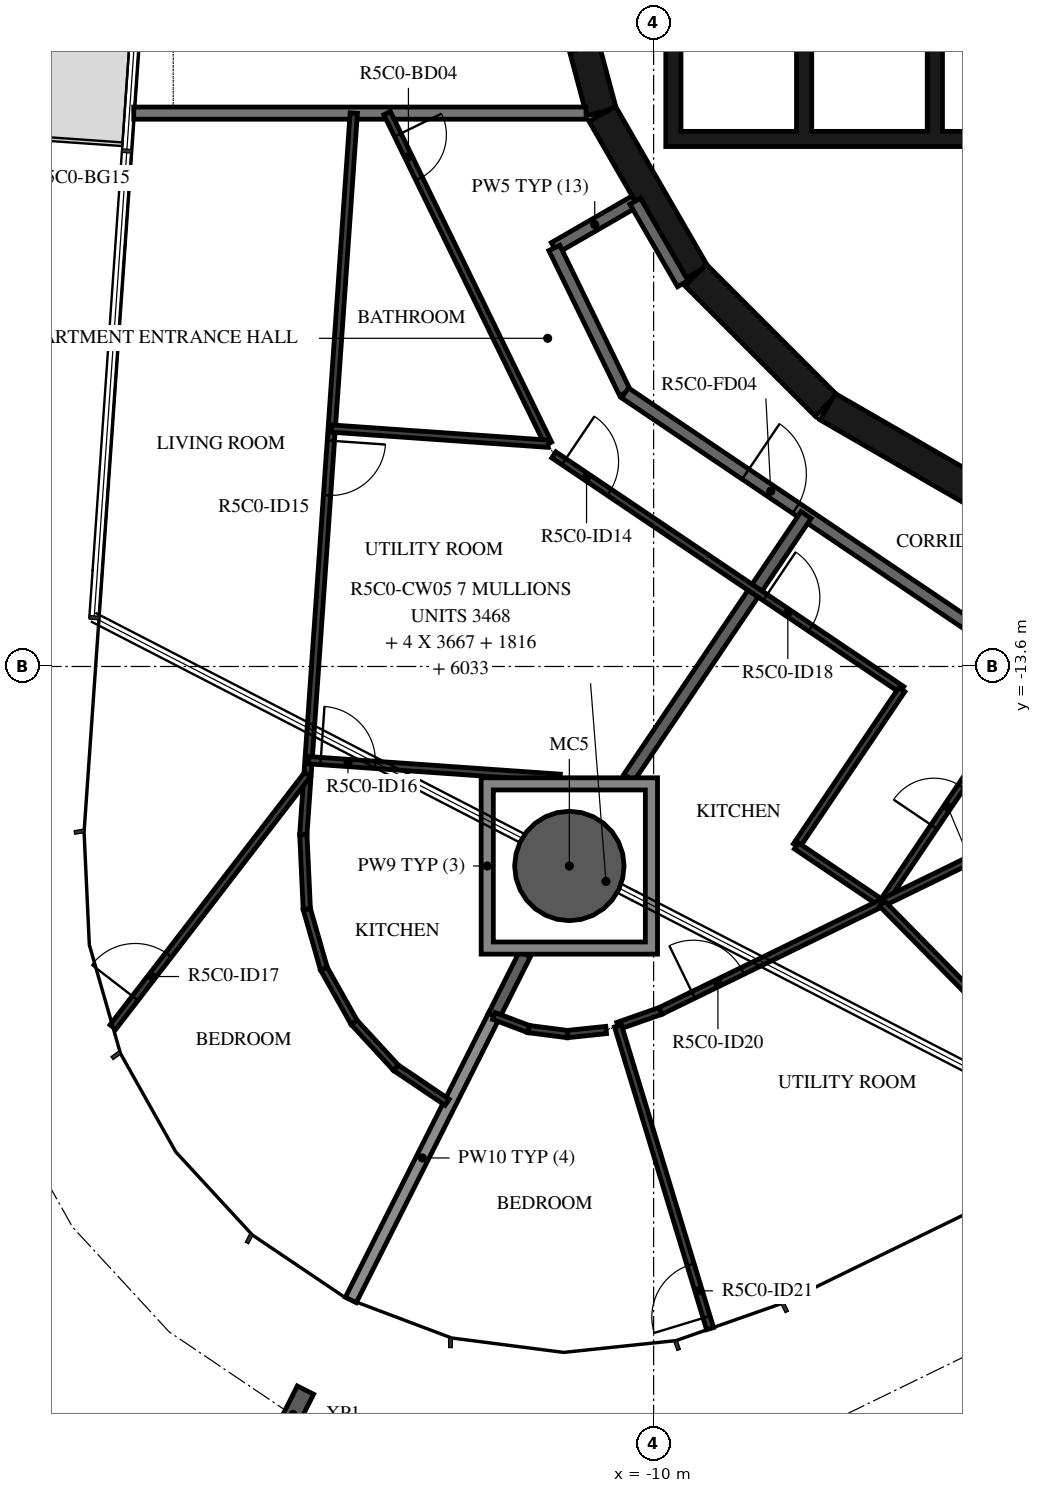
"""IFC4 building model, lengths in metres.
Left out: names, types, materials, properties, quantities, classifications, styles, units other than length and angle.
Written with IfcOpenShell. Run it as: python <this file> out.ifc"""

import sys

from ifc_helpers import new_model, si_unit, direction, frame, frame_2d, origin, origin_2d, place, context, subcontext, project, spatial, polyline, rectangle, hollow_circle, i_section, outline, extrude, element, fill, save


model = new_model("IFC4")
c1 = context("Model", 3, precision=1e-05, world=origin(), true_north=direction((0.0, 1.0)))
c2 = subcontext(c1, "Body", "Model", "MODEL_VIEW")
j1 = project(units=[si_unit("LENGTHUNIT", "METRE"), si_unit("PLANEANGLEUNIT", "RADIAN")], contexts=[c1])
p1 = place(None, origin())
s1 = spatial("IfcSite", under=j1, at=p1, CompositionType="ELEMENT")
p2 = place(p1, origin())
s2 = spatial("IfcBuilding", under=s1, at=p2, CompositionType="ELEMENT")
p3 = place(p2, frame((0.0, 0.0, 209.4)))
s3 = spatial("IfcBuildingStorey", under=s2, at=p3, CompositionType="ELEMENT", Elevation=209.4)
p4 = place(p3, frame((-11.386, -16.881, -0.38), z_axis=(0.0, 0.0, 1.0), x_axis=(1.0, 0.0, 0.0)))
e1 = element("IfcColumn", 1, at=p4, inside=s3, PredefinedType="COLUMN", context=c2, shape_type="SweptSolid", body=[
    extrude(hollow_circle(Radius=0.9, WallThickness=0.04, at=origin_2d()), origin(), (0.0, 0.0, 1.0), 3.5),
])
p5 = place(p3, frame((-15.928, -25.902, -0.38), z_axis=(0.0, 0.0, 1.0), x_axis=(-0.893169071277, 0.449721035881, 0.0)))
e2 = element("IfcColumn", 2, at=p5, inside=s3, PredefinedType="COLUMN", context=c2, shape_type="SweptSolid", body=[
    extrude(i_section(OverallWidth=0.3, OverallDepth=0.9, WebThickness=0.019, FlangeThickness=0.035, FilletRadius=0.03, at=origin_2d()), origin(), (0.0, 0.0, 1.0), 3.5),
])
p6 = place(p3, frame((-11.643, -1.55, 0.0), z_axis=(0.0, 0.0, 1.0), x_axis=(0.258734743916, -0.965948410781, 0.0)))
e3 = element("IfcWall", 3, at=p6, inside=s3, PredefinedType="SHEAR", context=c2, shape_type="SweptSolid", body=[
    extrude(rectangle(XDim=3.033, YDim=0.5, at=frame_2d((1.516, 0.0))), origin(), (0.0, 0.0, 1.0), 3.12),
])
p7 = place(p6, frame((1.066, 0.0, 0.0)))
e4 = element("IfcOpeningElement", 4, at=p7, cuts=e3, PredefinedType="OPENING", context=c2, shape_type="SweptSolid", body=[
    extrude(rectangle(XDim=0.9, YDim=2.1, at=frame_2d((0.45, 1.05))), frame((0.0, 0.26, 0.0), z_axis=(0.0, -1.0, 0.0), x_axis=(1.0, 0.0, 0.0)), (0.0, 0.0, 1.0), 0.52),
])
p8 = place(p3, frame((-10.845, -4.51, 0.0), z_axis=(0.0, 0.0, 1.0), x_axis=(0.500087131594, -0.865975092491, 0.0)))
e5 = element("IfcWall", 5, at=p8, inside=s3, PredefinedType="SHEAR", context=c2, shape_type="SweptSolid", body=[
    extrude(rectangle(XDim=3.033, YDim=0.5, at=frame_2d((1.516, 0.0))), origin(), (0.0, 0.0, 1.0), 3.12),
])
p9 = place(p3, frame((-9.308, -7.164, 0.0), z_axis=(0.0, 0.0, 1.0), x_axis=(0.707106781187, -0.707106781187, 0.0)))
e6 = element("IfcWall", 6, at=p9, inside=s3, PredefinedType="SHEAR", context=c2, shape_type="SweptSolid", body=[
    extrude(rectangle(XDim=3.032, YDim=0.5, at=frame_2d((1.516, 0.0))), origin(), (0.0, 0.0, 1.0), 3.12),
])
p10 = place(p3, frame((-7.137, -9.329, 0.0), z_axis=(0.0, 0.0, 1.0), x_axis=(0.865975092491, -0.500087131594, 0.0)))
e7 = element("IfcWall", 7, at=p10, inside=s3, PredefinedType="SHEAR", context=c2, shape_type="SweptSolid", body=[
    extrude(rectangle(XDim=3.033, YDim=0.5, at=frame_2d((1.516, 0.0))), origin(), (0.0, 0.0, 1.0), 3.12),
])
p11 = place(p3, origin())
e8 = element("IfcWall", 8, at=p11, inside=s3, PredefinedType="SHEAR", context=c2, shape_type="SweptSolid", body=[
    extrude(outline(polyline([(9.8, -5.05), (9.8, -4.8), (9.8, -1.9), (9.55, -1.9), (9.55, -4.8), (7.65, -4.8), (7.65, -1.9), (7.4, -1.9), (7.4, -4.8), (5.5, -4.8), (5.5, -1.9), (5.25, -1.9), (5.25, -4.8), (3.35, -4.8), (3.35, -1.9), (3.1, -1.9), (3.1, -4.8), (1.2, -4.8), (1.2, -1.9), (0.95, -1.9), (0.95, -4.8), (-5.25, -4.8), (-5.25, -1.9), (-5.5, -1.9), (-5.5, -4.8), (-7.4, -4.8), (-7.4, -1.9), (-7.65, -1.9), (-7.65, -4.8), (-9.55, -4.8), (-9.55, -1.9), (-9.8, -1.9), (-9.8, -4.8), (-9.8, -5.05), (9.8, -5.05)])), origin(), (0.0, 0.0, 1.0), 3.12),
])
p12 = place(p3, frame((-10.303, -5.949, 0.0), z_axis=(0.0, 0.0, 1.0), x_axis=(-0.866042588199, -0.499970234539, 0.0)))
e9 = element("IfcWall", 9, at=p12, inside=s3, PredefinedType="STANDARD", context=c2, shape_type="SweptSolid", body=[
    extrude(rectangle(XDim=1.535, YDim=0.2, at=frame_2d((0.768, 0.0))), origin(), (0.0, 0.0, 1.0), 3.12),
])
p13 = place(p3, frame((-11.633, -6.716, 0.0), z_axis=(0.0, 0.0, 1.0), x_axis=(0.438322116278, -0.898817958422, 0.0)))
e10 = element("IfcWall", 10, at=p13, inside=s3, PredefinedType="STANDARD", context=c2, shape_type="SweptSolid", body=[
    extrude(rectangle(XDim=2.654, YDim=0.2, at=frame_2d((1.327, 0.0))), origin(), (0.0, 0.0, 1.0), 3.12),
])
p14 = place(p3, frame((-10.47, -9.101, 0.0), z_axis=(0.0, 0.0, 1.0), x_axis=(0.829035841718, -0.559195469534, 0.0)))
e11 = element("IfcWall", 11, at=p14, inside=s3, PredefinedType="STANDARD", context=c2, shape_type="SweptSolid", body=[
    extrude(rectangle(XDim=7.181, YDim=0.2, at=frame_2d((3.591, 0.0))), origin(), (0.0, 0.0, 1.0), 3.12),
])
p15 = place(p14, frame((2.39, 0.0, 0.0)))
e12 = element("IfcOpeningElement", 12, at=p15, cuts=e11, PredefinedType="OPENING", context=c2, shape_type="SweptSolid", body=[
    extrude(rectangle(XDim=1.0, YDim=2.1, at=frame_2d((0.5, 1.05))), frame((0.0, 0.11, 0.0), z_axis=(0.0, -1.0, 0.0), x_axis=(1.0, 0.0, 0.0)), (0.0, 0.0, 1.0), 0.22),
])
p16 = place(p3, frame((-9.52, -7.305, 0.0), z_axis=(0.0, 0.0, 1.0), x_axis=(-0.500028278809, 0.866009076391, 0.0)))
e13 = element("IfcWall", 13, at=p16, inside=s3, PredefinedType="STANDARD", context=c2, shape_type="SweptSolid", body=[
    extrude(rectangle(XDim=1.566, YDim=0.2, at=frame_2d((0.783, 0.0))), origin(), (0.0, 0.0, 1.0), 3.12),
])
p17 = place(p3, frame((-18.55, -4.5, 0.0), z_axis=(0.0, 0.0, 1.0), x_axis=(1.0, 0.0, 0.0)))
e14 = element("IfcWall", 14, at=p17, inside=s3, PredefinedType="STANDARD", context=c2, shape_type="SweptSolid", body=[
    extrude(rectangle(XDim=7.438, YDim=0.2, at=frame_2d((3.719, 0.0))), origin(), (0.0, 0.0, 1.0), 3.12),
])
p18 = place(p3, frame((-10.408, -15.43, 0.0), z_axis=(0.0, 0.0, 1.0), x_axis=(0.559199317758, 0.829033246027, 0.0)))
e15 = element("IfcWall", 15, at=p18, inside=s3, PredefinedType="STANDARD", context=c2, shape_type="SweptSolid", body=[
    extrude(rectangle(XDim=5.212, YDim=0.2, at=frame_2d((2.606, 0.0))), origin(), (0.0, 0.0, 1.0), 3.12),
])
p19 = place(p3, frame((-14.979, -24.017, 0.0), z_axis=(0.0, 0.0, 1.0), x_axis=(0.449732900329, 0.89316309729, 0.0)))
e16 = element("IfcWall", 16, at=p19, inside=s3, PredefinedType="STANDARD", context=c2, shape_type="SweptSolid", body=[
    extrude(rectangle(XDim=5.229, YDim=0.2, at=frame_2d((2.615, 0.0))), origin(), (0.0, 0.0, 1.0), 2.73),
])
p20 = place(p3, frame((-12.628, -19.347, 0.0), z_axis=(0.0, 0.0, 1.0), x_axis=(0.449615653781, 0.8932221246, 0.0)))
e17 = element("IfcWall", 17, at=p20, inside=s3, PredefinedType="STANDARD", context=c2, shape_type="SweptSolid", body=[
    extrude(rectangle(XDim=1.138, YDim=0.2, at=frame_2d((0.569, 0.0))), origin(), (0.0, 0.0, 1.0), 3.12),
])
p21 = place(p3, frame((-14.383, -4.5, 0.0), z_axis=(0.0, 0.0, 1.0), x_axis=(0.438393414895, -0.898783185077, 0.0)))
e18 = element("IfcWall", 18, at=p21, inside=s3, PredefinedType="PARTITIONING", context=c2, shape_type="SweptSolid", body=[
    extrude(rectangle(XDim=6.049, YDim=0.12, at=frame_2d((3.024, 0.0))), origin(), (0.0, 0.0, 1.0), 3.12),
])
p22 = place(p21, frame((0.4, 0.0, 0.0)))
e19 = element("IfcOpeningElement", 19, at=p22, cuts=e18, PredefinedType="OPENING", context=c2, shape_type="SweptSolid", body=[
    extrude(rectangle(XDim=0.8, YDim=2.1, at=frame_2d((0.4, 1.05))), frame((0.0, 0.07, 0.0), z_axis=(0.0, -1.0, 0.0), x_axis=(1.0, 0.0, 0.0)), (0.0, 0.0, 1.0), 0.14),
])
p23 = place(p3, frame((-11.642, -10.12, 0.0), z_axis=(0.0, 0.0, 1.0), x_axis=(0.829029427133, -0.559204979365, 0.0)))
e20 = element("IfcWall", 20, at=p23, inside=s3, PredefinedType="PARTITIONING", context=c2, shape_type="SweptSolid", body=[
    extrude(rectangle(XDim=6.904, YDim=0.12, at=frame_2d((3.452, 0.0))), origin(), (0.0, 0.0, 1.0), 3.12),
])
p24 = place(p23, frame((0.2, 0.0, 0.0)))
e21 = element("IfcOpeningElement", 21, at=p24, cuts=e20, PredefinedType="OPENING", context=c2, shape_type="SweptSolid", body=[
    extrude(rectangle(XDim=0.9, YDim=2.1, at=frame_2d((0.45, 1.05))), frame((0.0, 0.07, 0.0), z_axis=(0.0, -1.0, 0.0), x_axis=(1.0, 0.0, 0.0)), (0.0, 0.0, 1.0), 0.14),
])
p25 = place(p23, frame((4.192, 0.0, 0.0)))
e22 = element("IfcOpeningElement", 22, at=p25, cuts=e20, PredefinedType="OPENING", context=c2, shape_type="SweptSolid", body=[
    extrude(rectangle(XDim=0.9, YDim=2.1, at=frame_2d((0.45, 1.05))), frame((0.0, 0.07, 0.0), z_axis=(0.0, -1.0, 0.0), x_axis=(1.0, 0.0, 0.0)), (0.0, 0.0, 1.0), 0.14),
])
p26 = place(p3, frame((-14.931, -4.5, 0.0), z_axis=(0.0, 0.0, 1.0), x_axis=(-0.069751708439, -0.997564383471, 0.0)))
e23 = element("IfcWall", 23, at=p26, inside=s3, PredefinedType="PARTITIONING", context=c2, shape_type="SweptSolid", body=[
    extrude(rectangle(XDim=11.894, YDim=0.12, at=frame_2d((5.947, 0.0))), origin(), (0.0, 0.0, 1.0), 3.12),
])
p27 = place(p26, frame((5.4, 0.0, 0.0)))
e24 = element("IfcOpeningElement", 24, at=p27, cuts=e23, PredefinedType="OPENING", context=c2, shape_type="SweptSolid", body=[
    extrude(rectangle(XDim=0.9, YDim=2.1, at=frame_2d((0.45, 1.05))), frame((0.0, 0.07, 0.0), z_axis=(0.0, -1.0, 0.0), x_axis=(1.0, 0.0, 0.0)), (0.0, 0.0, 1.0), 0.14),
])
p28 = place(p3, frame((-15.294, -9.688, 0.0), z_axis=(0.0, 0.0, 1.0), x_axis=(0.997565819809, -0.069731163391, 0.0)))
e25 = element("IfcWall", 25, at=p28, inside=s3, PredefinedType="PARTITIONING", context=c2, shape_type="SweptSolid", body=[
    extrude(rectangle(XDim=3.571, YDim=0.12, at=frame_2d((1.786, 0.0))), origin(), (0.0, 0.0, 1.0), 3.12),
])
p29 = place(p3, frame((-18.892, -19.531, 0.0), z_axis=(0.0, 0.0, 1.0), x_axis=(0.610347240441, 0.792133982408, 0.0)))
e26 = element("IfcWall", 26, at=p29, inside=s3, PredefinedType="PARTITIONING", context=c2, shape_type="SweptSolid", body=[
    extrude(rectangle(XDim=5.244, YDim=0.12, at=frame_2d((2.622, 0.0))), origin(), (0.0, 0.0, 1.0), 3.12),
])
p30 = place(p29, frame((0.6, 0.0, 0.0)))
e27 = element("IfcOpeningElement", 27, at=p30, cuts=e26, PredefinedType="OPENING", context=c2, shape_type="SweptSolid", body=[
    extrude(rectangle(XDim=0.9, YDim=2.1, at=frame_2d((0.45, 1.05))), frame((0.0, 0.07, 0.0), z_axis=(0.0, -1.0, 0.0), x_axis=(1.0, 0.0, 0.0)), (0.0, 0.0, 1.0), 0.14),
])
p31 = place(p3, frame((-15.675, -15.141, 0.0), z_axis=(0.0, 0.0, 1.0), x_axis=(0.997563107735, -0.06976995117, 0.0)))
e28 = element("IfcWall", 28, at=p31, inside=s3, PredefinedType="PARTITIONING", context=c2, shape_type="SweptSolid", body=[
    extrude(rectangle(XDim=4.146, YDim=0.12, at=frame_2d((2.073, 0.0))), origin(), (0.0, 0.0, 1.0), 3.12),
])
p32 = place(p31, frame((0.2, 0.0, 0.0)))
e29 = element("IfcOpeningElement", 29, at=p32, cuts=e28, PredefinedType="OPENING", context=c2, shape_type="SweptSolid", body=[
    extrude(rectangle(XDim=0.9, YDim=2.1, at=frame_2d((0.45, 1.05))), frame((0.0, 0.07, 0.0), z_axis=(0.0, -1.0, 0.0), x_axis=(1.0, 0.0, 0.0)), (0.0, 0.0, 1.0), 0.14),
])
for number, where, z_axis, x_axis in (
    (30, (-13.395, -20.767, 0.0), (0.0, 0.0, 1.0), (-0.829, 0.559, 0.0)),
    (31, (-14.237, -20.199, 0.0), (0.0, 0.0, 1.0), (-0.678, 0.735, 0.0)),
):
    element("IfcWall", number, at=place(p3, frame(where, z_axis=z_axis, x_axis=x_axis)), inside=s3, PredefinedType="PARTITIONING", context=c2, shape_type="SweptSolid", body=[
        extrude(rectangle(XDim=1.016, YDim=0.12, at=frame_2d((0.508, 0.0))), origin(), (0.0, 0.0, 1.0), 3.12),
    ])
p33 = place(p3, frame((-14.926, -19.452, 0.0), z_axis=(0.0, 0.0, 1.0), x_axis=(-0.489941776958, 0.871755157823, 0.0)))
e32 = element("IfcWall", 32, at=p33, inside=s3, PredefinedType="PARTITIONING", context=c2, shape_type="SweptSolid", body=[
    extrude(rectangle(XDim=1.016, YDim=0.12, at=frame_2d((0.508, 0.0))), origin(), (0.0, 0.0, 1.0), 3.12),
])
p34 = place(p3, frame((-15.424, -18.567, 0.0), z_axis=(0.0, 0.0, 1.0), x_axis=(-0.275641454312, 0.961260520704, 0.0)))
e33 = element("IfcWall", 33, at=p34, inside=s3, PredefinedType="PARTITIONING", context=c2, shape_type="SweptSolid", body=[
    extrude(rectangle(XDim=1.016, YDim=0.12, at=frame_2d((0.508, 0.0))), origin(), (0.0, 0.0, 1.0), 3.12),
])
p35 = place(p3, frame((-15.704, -17.59, 0.0), z_axis=(0.0, 0.0, 1.0), x_axis=(-0.046364428258, 0.998924591645, 0.0)))
e34 = element("IfcWall", 34, at=p35, inside=s3, PredefinedType="PARTITIONING", context=c2, shape_type="SweptSolid", body=[
    extrude(rectangle(XDim=1.227, YDim=0.12, at=frame_2d((0.613, 0.0))), origin(), (0.0, 0.0, 1.0), 3.12),
])
p36 = place(p3, frame((-5.918, -13.981, 0.0), z_axis=(0.0, 0.0, 1.0), x_axis=(-0.559254999968, -0.828995684555, 0.0)))
e35 = element("IfcWall", 35, at=p36, inside=s3, PredefinedType="PARTITIONING", context=c2, shape_type="SweptSolid", body=[
    extrude(rectangle(XDim=3.099, YDim=0.12, at=frame_2d((1.55, 0.0))), origin(), (0.0, 0.0, 1.0), 3.12),
])
p37 = place(p3, frame((-7.652, -16.55, 0.0), z_axis=(0.0, 0.0, 1.0), x_axis=(0.829053397483, -0.559169441334, 0.0)))
e36 = element("IfcWall", 36, at=p37, inside=s3, PredefinedType="PARTITIONING", context=c2, shape_type="SweptSolid", body=[
    extrude(rectangle(XDim=1.686, YDim=0.12, at=frame_2d((0.843, 0.0))), origin(), (0.0, 0.0, 1.0), 3.12),
])
p38 = place(p3, frame((-6.229, -17.48, 0.0), z_axis=(0.0, 0.0, 1.0), x_axis=(0.559206483048, 0.829028412853, 0.0)))
e37 = element("IfcWall", 37, at=p38, inside=s3, PredefinedType="PARTITIONING", context=c2, shape_type="SweptSolid", body=[
    extrude(rectangle(XDim=3.432, YDim=0.12, at=frame_2d((1.716, 0.0))), origin(), (0.0, 0.0, 1.0), 3.12),
])
p39 = place(p38, frame((1.5, 0.0, 0.0)))
e38 = element("IfcOpeningElement", 38, at=p39, cuts=e37, PredefinedType="OPENING", context=c2, shape_type="SweptSolid", body=[
    extrude(rectangle(XDim=0.8, YDim=2.1, at=frame_2d((0.4, 1.05))), frame((0.0, 0.07, 0.0), z_axis=(0.0, -1.0, 0.0), x_axis=(1.0, 0.0, 0.0)), (0.0, 0.0, 1.0), 0.14),
])
p40 = place(p3, frame((-12.628, -19.347, 0.0), z_axis=(0.0, 0.0, 1.0), x_axis=(0.935507243946, -0.353307509862, 0.0)))
e39 = element("IfcWall", 39, at=p40, inside=s3, PredefinedType="PARTITIONING", context=c2, shape_type="SweptSolid", body=[
    extrude(rectangle(XDim=0.612, YDim=0.12, at=frame_2d((0.306, 0.0))), origin(), (0.0, 0.0, 1.0), 3.12),
])
p41 = place(p3, frame((-12.055, -19.563, 0.0), z_axis=(0.0, 0.0, 1.0), x_axis=(0.991802759529, -0.127778269633, 0.0)))
e40 = element("IfcWall", 40, at=p41, inside=s3, PredefinedType="PARTITIONING", context=c2, shape_type="SweptSolid", body=[
    extrude(rectangle(XDim=0.642, YDim=0.12, at=frame_2d((0.321, 0.0))), origin(), (0.0, 0.0, 1.0), 3.12),
])
p42 = place(p3, frame((-11.418, -19.645, 0.0), z_axis=(0.0, 0.0, 1.0), x_axis=(0.994515867502, 0.104585798686, 0.0)))
e41 = element("IfcWall", 41, at=p42, inside=s3, PredefinedType="PARTITIONING", context=c2, shape_type="SweptSolid", body=[
    extrude(rectangle(XDim=0.642, YDim=0.12, at=frame_2d((0.321, 0.0))), origin(), (0.0, 0.0, 1.0), 3.12),
])
p43 = place(p3, frame((-10.586, -19.51, 0.0), z_axis=(0.0, 0.0, 1.0), x_axis=(0.943560277016, 0.3312008509, 0.0)))
e42 = element("IfcWall", 42, at=p43, inside=s3, PredefinedType="PARTITIONING", context=c2, shape_type="SweptSolid", body=[
    extrude(rectangle(XDim=0.741, YDim=0.12, at=frame_2d((0.371, 0.0))), origin(), (0.0, 0.0, 1.0), 3.12),
])
p44 = place(p3, frame((-9.886, -19.264, 0.0), z_axis=(0.0, 0.0, 1.0), x_axis=(0.898796326112, 0.43836647245, 0.0)))
e43 = element("IfcWall", 43, at=p44, inside=s3, PredefinedType="PARTITIONING", context=c2, shape_type="SweptSolid", body=[
    extrude(rectangle(XDim=10.014, YDim=0.12, at=frame_2d((5.007, 0.0))), origin(), (0.0, 0.0, 1.0), 3.12),
])
p45 = place(p44, frame((0.6, 0.0, 0.0)))
e44 = element("IfcOpeningElement", 44, at=p45, cuts=e43, PredefinedType="OPENING", context=c2, shape_type="SweptSolid", body=[
    extrude(rectangle(XDim=0.9, YDim=2.1, at=frame_2d((0.45, 1.05))), frame((0.0, 0.07, 0.0), z_axis=(0.0, -1.0, 0.0), x_axis=(1.0, 0.0, 0.0)), (0.0, 0.0, 1.0), 0.14),
])
p46 = place(p3, frame((-9.072, -24.489, 0.0), z_axis=(0.0, 0.0, 1.0), x_axis=(-0.291025348593, 0.956715342449, 0.0)))
e45 = element("IfcWall", 45, at=p46, inside=s3, PredefinedType="PARTITIONING", context=c2, shape_type="SweptSolid", body=[
    extrude(rectangle(XDim=5.205, YDim=0.12, at=frame_2d((2.602, 0.0))), origin(), (0.0, 0.0, 1.0), 3.12),
])
p47 = place(p46, frame((0.2, 0.0, 0.0)))
e46 = element("IfcOpeningElement", 46, at=p47, cuts=e45, PredefinedType="OPENING", context=c2, shape_type="SweptSolid", body=[
    extrude(rectangle(XDim=0.9, YDim=2.1, at=frame_2d((0.45, 1.05))), frame((0.0, 0.07, 0.0), z_axis=(0.0, -1.0, 0.0), x_axis=(1.0, 0.0, 0.0)), (0.0, 0.0, 1.0), 0.14),
])
p48 = place(p3, frame((-2.403, -21.4, 0.0), z_axis=(0.0, 0.0, 1.0), x_axis=(-0.70162063199, 0.712550692067, 0.0)))
e47 = element("IfcWall", 47, at=p48, inside=s3, PredefinedType="PARTITIONING", context=c2, shape_type="SweptSolid", body=[
    extrude(rectangle(XDim=5.472, YDim=0.12, at=frame_2d((2.736, 0.0))), origin(), (0.0, 0.0, 1.0), 3.12),
])
p49 = place(p3, origin())
e48 = element("IfcWall", 48, at=p49, inside=s3, PredefinedType="STANDARD", context=c2, shape_type="SweptSolid", body=[
    extrude(outline(polyline([(-9.936, -15.43), (-9.936, -18.331), (-12.836, -18.331), (-12.836, -15.43), (-9.936, -15.43)]), holes=[polyline([(-12.636, -18.131), (-10.136, -18.131), (-10.136, -15.631), (-12.636, -15.631), (-12.636, -18.131)])]), origin(), (0.0, 0.0, 1.0), 3.12),
])
p50 = place(p15, origin())
e49 = element("IfcDoor", 49, at=p50, inside=s3, OperationType="SINGLE_SWING_RIGHT", PredefinedType="DOOR", context=c2, shape_type="SweptSolid", body=[
    extrude(rectangle(XDim=1.0, YDim=2.1, at=frame_2d((0.5, 1.05))), frame((0.0, 0.025, 0.0), z_axis=(0.0, -1.0, 0.0), x_axis=(1.0, 0.0, 0.0)), (0.0, 0.0, 1.0), 0.05),
])
fill(e12, e49)
p51 = place(p22, origin())
e50 = element("IfcDoor", 50, at=p51, inside=s3, OperationType="SINGLE_SWING_RIGHT", PredefinedType="DOOR", context=c2, shape_type="SweptSolid", body=[
    extrude(rectangle(XDim=0.8, YDim=2.1, at=frame_2d((0.4, 1.05))), frame((0.0, 0.025, 0.0), z_axis=(0.0, -1.0, 0.0), x_axis=(1.0, 0.0, 0.0)), (0.0, 0.0, 1.0), 0.05),
])
fill(e19, e50)
p52 = place(p24, origin())
e51 = element("IfcDoor", 51, at=p52, inside=s3, OperationType="SINGLE_SWING_RIGHT", PredefinedType="DOOR", context=c2, shape_type="SweptSolid", body=[
    extrude(rectangle(XDim=0.9, YDim=2.1, at=frame_2d((0.45, 1.05))), frame((0.0, 0.025, 0.0), z_axis=(0.0, -1.0, 0.0), x_axis=(1.0, 0.0, 0.0)), (0.0, 0.0, 1.0), 0.05),
])
fill(e21, e51)
p53 = place(p27, origin())
e52 = element("IfcDoor", 52, at=p53, inside=s3, OperationType="SINGLE_SWING_RIGHT", PredefinedType="DOOR", context=c2, shape_type="SweptSolid", body=[
    extrude(rectangle(XDim=0.9, YDim=2.1, at=frame_2d((0.45, 1.05))), frame((0.0, 0.025, 0.0), z_axis=(0.0, -1.0, 0.0), x_axis=(1.0, 0.0, 0.0)), (0.0, 0.0, 1.0), 0.05),
])
fill(e24, e52)
p54 = place(p32, origin())
e53 = element("IfcDoor", 53, at=p54, inside=s3, OperationType="SINGLE_SWING_RIGHT", PredefinedType="DOOR", context=c2, shape_type="SweptSolid", body=[
    extrude(rectangle(XDim=0.9, YDim=2.1, at=frame_2d((0.45, 1.05))), frame((0.0, 0.025, 0.0), z_axis=(0.0, -1.0, 0.0), x_axis=(1.0, 0.0, 0.0)), (0.0, 0.0, 1.0), 0.05),
])
fill(e29, e53)
p55 = place(p30, origin())
e54 = element("IfcDoor", 54, at=p55, inside=s3, OperationType="SINGLE_SWING_RIGHT", PredefinedType="DOOR", context=c2, shape_type="SweptSolid", body=[
    extrude(rectangle(XDim=0.9, YDim=2.1, at=frame_2d((0.45, 1.05))), frame((0.0, 0.025, 0.0), z_axis=(0.0, -1.0, 0.0), x_axis=(1.0, 0.0, 0.0)), (0.0, 0.0, 1.0), 0.05),
])
fill(e27, e54)
p56 = place(p25, origin())
e55 = element("IfcDoor", 55, at=p56, inside=s3, OperationType="SINGLE_SWING_LEFT", PredefinedType="DOOR", context=c2, shape_type="SweptSolid", body=[
    extrude(rectangle(XDim=0.9, YDim=2.1, at=frame_2d((0.45, 1.05))), frame((0.0, 0.025, 0.0), z_axis=(0.0, -1.0, 0.0), x_axis=(1.0, 0.0, 0.0)), (0.0, 0.0, 1.0), 0.05),
])
fill(e22, e55)
p57 = place(p39, origin())
e56 = element("IfcDoor", 56, at=p57, inside=s3, OperationType="SINGLE_SWING_LEFT", PredefinedType="DOOR", context=c2, shape_type="SweptSolid", body=[
    extrude(rectangle(XDim=0.8, YDim=2.1, at=frame_2d((0.4, 1.05))), frame((0.0, 0.025, 0.0), z_axis=(0.0, -1.0, 0.0), x_axis=(1.0, 0.0, 0.0)), (0.0, 0.0, 1.0), 0.05),
])
fill(e38, e56)
p58 = place(p45, origin())
e57 = element("IfcDoor", 57, at=p58, inside=s3, OperationType="SINGLE_SWING_LEFT", PredefinedType="DOOR", context=c2, shape_type="SweptSolid", body=[
    extrude(rectangle(XDim=0.9, YDim=2.1, at=frame_2d((0.45, 1.05))), frame((0.0, 0.025, 0.0), z_axis=(0.0, -1.0, 0.0), x_axis=(1.0, 0.0, 0.0)), (0.0, 0.0, 1.0), 0.05),
])
fill(e44, e57)
p59 = place(p47, origin())
e58 = element("IfcDoor", 58, at=p59, inside=s3, OperationType="SINGLE_SWING_LEFT", PredefinedType="DOOR", context=c2, shape_type="SweptSolid", body=[
    extrude(rectangle(XDim=0.9, YDim=2.1, at=frame_2d((0.45, 1.05))), frame((0.0, 0.025, 0.0), z_axis=(0.0, -1.0, 0.0), x_axis=(1.0, 0.0, 0.0)), (0.0, 0.0, 1.0), 0.05),
])
fill(e46, e58)
save(model, sys.argv[1])
